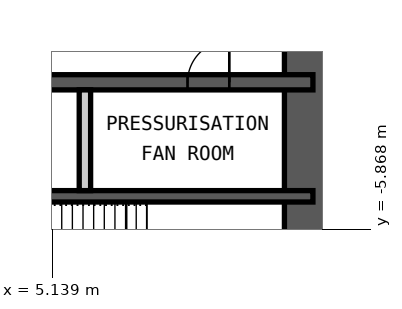
"""IFC4 building model, lengths in metres.
Left out: names, types, materials, properties, quantities, classifications, styles, units other than length and angle.
Written with IfcOpenShell. Run it as: python <this file> out.ifc"""

import sys

from ifc_helpers import new_model, si_unit, direction, frame, frame_2d, origin, place, context, subcontext, project, spatial, rectangle, extrude, element, fill, save


model = new_model("IFC4")
c1 = context("Model", 3, precision=1e-05, world=origin(), true_north=direction((0.0, 1.0)))
c2 = subcontext(c1, "Body", "Model", "MODEL_VIEW")
j1 = project(units=[si_unit("LENGTHUNIT", "METRE"), si_unit("PLANEANGLEUNIT", "RADIAN")], contexts=[c1])
p1 = place(None, origin())
s1 = spatial("IfcSite", under=j1, at=p1, CompositionType="ELEMENT")
p2 = place(p1, origin())
s2 = spatial("IfcBuilding", under=s1, at=p2, CompositionType="ELEMENT")
p3 = place(p2, frame((0.0, 0.0, 136.6)))
s3 = spatial("IfcBuildingStorey", under=s2, at=p3, CompositionType="ELEMENT", Elevation=136.6)
p4 = place(p3, frame((12.0, -9.0, 0.0), z_axis=(0.0, 0.0, 1.0), x_axis=(0.0, 1.0, 0.0)))
e1 = element("IfcWall", 1, at=p4, inside=s3, PredefinedType="SHEAR", context=c2, shape_type="SweptSolid", body=[
    extrude(rectangle(XDim=18.0, YDim=1.5, at=frame_2d((9.0, 0.0))), origin(), (0.0, 0.0, 1.0), 4.2),
])
p5 = place(p4, frame((8.1, 0.0, 0.0)))
e2 = element("IfcOpeningElement", 2, at=p5, cuts=e1, PredefinedType="OPENING", context=c2, shape_type="SweptSolid", body=[
    extrude(rectangle(XDim=1.8, YDim=2.1, at=frame_2d((0.9, 1.05))), frame((0.0, 0.76, 0.0), z_axis=(0.0, -1.0, 0.0), x_axis=(1.0, 0.0, 0.0)), (0.0, 0.0, 1.0), 1.52),
])
p6 = place(p3, frame((-12.0, -2.0, 0.0), z_axis=(0.0, 0.0, 1.0), x_axis=(1.0, 0.0, 0.0)))
e3 = element("IfcWall", 3, at=p6, inside=s3, PredefinedType="SHEAR", context=c2, shape_type="SweptSolid", body=[
    extrude(rectangle(XDim=24.0, YDim=0.4, at=frame_2d((12.0, 0.0))), origin(), (0.0, 0.0, 1.0), 4.2),
])
p7 = place(p6, frame((1.1, 0.0, 0.0)))
e4 = element("IfcOpeningElement", 4, at=p7, cuts=e3, PredefinedType="OPENING", context=c2, shape_type="SweptSolid", body=[
    extrude(rectangle(XDim=1.1, YDim=2.1, at=frame_2d((0.55, 1.05))), frame((0.0, 0.21, 0.0), z_axis=(0.0, -1.0, 0.0), x_axis=(1.0, 0.0, 0.0)), (0.0, 0.0, 1.0), 0.42),
])
p8 = place(p6, frame((13.55, 0.0, 0.0)))
e5 = element("IfcOpeningElement", 5, at=p8, cuts=e3, PredefinedType="OPENING", context=c2, shape_type="SweptSolid", body=[
    extrude(rectangle(XDim=1.1, YDim=2.1, at=frame_2d((0.55, 1.05))), frame((0.0, 0.21, 0.0), z_axis=(0.0, -1.0, 0.0), x_axis=(1.0, 0.0, 0.0)), (0.0, 0.0, 1.0), 0.42),
])
p9 = place(p6, frame((20.7, 0.0, 0.0)))
e6 = element("IfcOpeningElement", 6, at=p9, cuts=e3, PredefinedType="OPENING", context=c2, shape_type="SweptSolid", body=[
    extrude(rectangle(XDim=1.1, YDim=2.1, at=frame_2d((0.55, 1.05))), frame((0.0, 0.21, 0.0), z_axis=(0.0, -1.0, 0.0), x_axis=(1.0, 0.0, 0.0)), (0.0, 0.0, 1.0), 0.42),
])
p10 = place(p6, frame((4.0, 0.0, 0.0)))
e7 = element("IfcOpeningElement", 7, at=p10, cuts=e3, PredefinedType="OPENING", context=c2, shape_type="SweptSolid", body=[
    extrude(rectangle(XDim=1.0, YDim=2.1, at=frame_2d((0.5, 1.05))), frame((0.0, 0.21, 0.0), z_axis=(0.0, -1.0, 0.0), x_axis=(1.0, 0.0, 0.0)), (0.0, 0.0, 1.0), 0.42),
])
p11 = place(p3, frame((-12.0, -5.0, 0.0), z_axis=(0.0, 0.0, 1.0), x_axis=(1.0, 0.0, 0.0)))
e8 = element("IfcWall", 8, at=p11, inside=s3, PredefinedType="SHEAR", context=c2, shape_type="SweptSolid", body=[
    extrude(rectangle(XDim=24.0, YDim=0.3, at=frame_2d((12.0, 0.0))), origin(), (0.0, 0.0, 1.0), 4.2),
])
p12 = place(p3, frame((6.0, -4.85, 0.0), z_axis=(0.0, 0.0, 1.0), x_axis=(0.0, 1.0, 0.0)))
e9 = element("IfcWall", 9, at=p12, inside=s3, PredefinedType="PARTITIONING", context=c2, shape_type="SweptSolid", body=[
    extrude(rectangle(XDim=2.65, YDim=0.3, at=frame_2d((1.325, 0.0))), origin(), (0.0, 0.0, 1.0), 3.98),
])
p13 = place(p9, origin())
e10 = element("IfcDoor", 10, at=p13, inside=s3, OperationType="SINGLE_SWING_LEFT", PredefinedType="DOOR", context=c2, shape_type="SweptSolid", body=[
    extrude(rectangle(XDim=1.1, YDim=2.1, at=frame_2d((0.55, 1.05))), frame((0.0, 0.025, 0.0), z_axis=(0.0, -1.0, 0.0), x_axis=(1.0, 0.0, 0.0)), (0.0, 0.0, 1.0), 0.05),
])
fill(e6, e10)
save(model, sys.argv[1])
